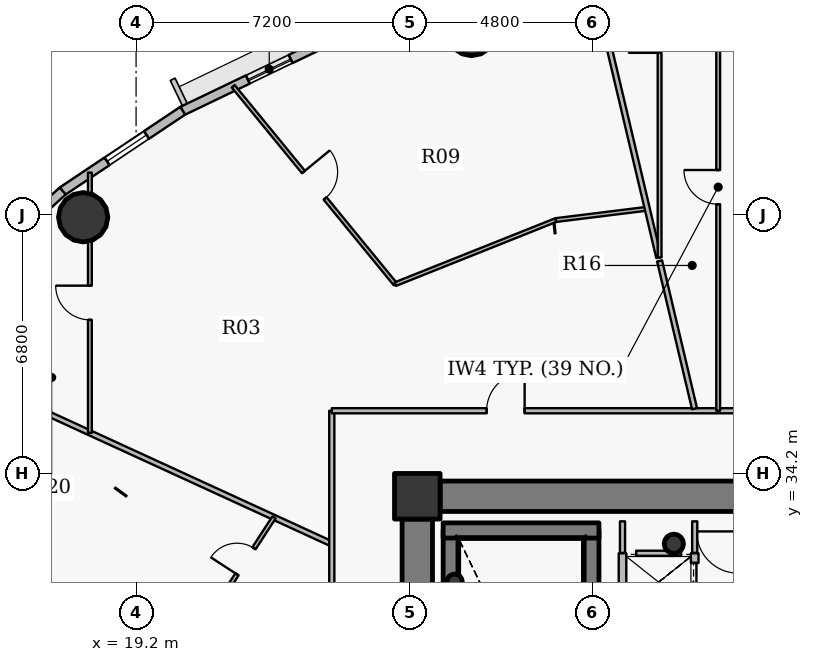
"""IFC4 building model, lengths in metres.
Left out: names, types, materials, properties, quantities, classifications, styles, units other than length and angle.
Written with IfcOpenShell. Run it as: python <this file> out.ifc"""

import sys

from ifc_helpers import new_model, si_unit, direction, frame, frame_2d, origin, origin_2d, place, context, subcontext, project, spatial, rectangle, hollow_circle, extrude, source, transform, mapped, element, fill, save


model = new_model("IFC4")
c1 = context("Model", 3, precision=1e-05, world=origin(), true_north=direction((0.0, 1.0)))
c2 = subcontext(c1, "Body", "Model", "MODEL_VIEW")
j1 = project(units=[si_unit("LENGTHUNIT", "METRE"), si_unit("PLANEANGLEUNIT", "RADIAN")], contexts=[c1])
p1 = place(None, origin())
s1 = spatial("IfcSite", under=j1, at=p1, CompositionType="ELEMENT")
p2 = place(p1, origin())
s2 = spatial("IfcBuilding", under=s1, at=p2, CompositionType="ELEMENT")
p3 = place(p2, frame((0.0, 0.0, 156.15)))
s3 = spatial("IfcBuildingStorey", under=s2, at=p3, CompositionType="ELEMENT", Elevation=156.15)
p4 = place(p3, frame((26.6, 33.6, 0.0), z_axis=(0.0, 0.0, 1.0), x_axis=(1.0, 0.0, 0.0)))
e1 = element("IfcColumn", 1, at=p4, inside=s3, PredefinedType="COLUMN", context=c2, shape_type="SweptSolid", body=[
    extrude(rectangle(XDim=1.2, YDim=1.2, at=origin_2d()), origin(), (0.0, 0.0, 1.0), 3.75),
])
p5 = place(p3, frame((33.35, 32.35, 0.0), z_axis=(0.0, 0.0, 1.0), x_axis=(1.0, 0.0, 0.0)))
e2 = element("IfcColumn", 2, at=p5, inside=s3, PredefinedType="COLUMN", context=c2, shape_type="SweptSolid", body=[
    extrude(hollow_circle(Radius=0.254, WallThickness=0.02, at=origin_2d()), origin(), (0.0, 0.0, 1.0), 3.75),
])
p6 = place(p3, frame((27.48, 24.1, 0.0), z_axis=(0.0, 0.0, 1.0), x_axis=(0.0, 1.0, 0.0)))
e3 = element("IfcWall", 3, at=p6, inside=s3, PredefinedType="SHEAR", context=c2, shape_type="SweptSolid", body=[
    extrude(rectangle(XDim=8.6, YDim=0.4, at=frame_2d((4.3, 0.0))), origin(), (0.0, 0.0, 1.0), 3.75),
])
p7 = place(p3, frame((31.18, 27.8, 0.0), z_axis=(0.0, 0.0, 1.0), x_axis=(0.0, 1.0, 0.0)))
e4 = element("IfcWall", 4, at=p7, inside=s3, PredefinedType="SHEAR", context=c2, shape_type="SweptSolid", body=[
    extrude(rectangle(XDim=4.9, YDim=0.4, at=frame_2d((2.45, 0.0))), origin(), (0.0, 0.0, 1.0), 3.75),
])
p8 = place(p3, frame((27.28, 32.7, 0.0), z_axis=(0.0, 0.0, 1.0), x_axis=(1.0, 0.0, 0.0)))
e5 = element("IfcWall", 5, at=p8, inside=s3, PredefinedType="SHEAR", context=c2, shape_type="SweptSolid", body=[
    extrude(rectangle(XDim=4.1, YDim=0.4, at=frame_2d((2.05, 0.0))), origin(), (0.0, 0.0, 1.0), 3.75),
])
p9 = place(p3, frame((27.58, 31.35, 0.0), z_axis=(0.0, 0.0, 1.0), x_axis=(1.0, 0.0, 0.0)))
e6 = element("IfcColumn", 6, at=p9, inside=s3, PredefinedType="COLUMN", context=c2, shape_type="SweptSolid", body=[
    extrude(hollow_circle(Radius=0.203, WallThickness=0.016, at=origin_2d()), origin(), (0.0, 0.0, 1.0), 3.75),
])
p10 = place(p3, frame((27.2, 33.6, 0.0), z_axis=(0.0, 0.0, 1.0), x_axis=(1.0, 0.0, 0.0)))
e7 = element("IfcWall", 7, at=p10, inside=s3, PredefinedType="SHEAR", context=c2, shape_type="SweptSolid", body=[
    extrude(rectangle(XDim=17.6, YDim=0.8, at=frame_2d((8.8, 0.0))), origin(), (0.0, 0.0, 1.0), 2.95),
])
p11 = place(p10, frame((13.45, 0.0, 0.0)))
e8 = element("IfcOpeningElement", 8, at=p11, cuts=e7, PredefinedType="OPENING", context=c2, shape_type="SweptSolid", body=[
    extrude(rectangle(XDim=1.15, YDim=2.15, at=origin_2d()), frame((0.575, 0.41, 1.075), z_axis=(0.0, -1.0, 0.0), x_axis=(1.0, 0.0, 0.0)), (0.0, 0.0, 1.0), 0.82),
])
p12 = place(p3, frame((26.6, 21.0, 0.0), z_axis=(0.0, 0.0, 1.0), x_axis=(0.0, 1.0, 0.0)))
e9 = element("IfcWall", 9, at=p12, inside=s3, PredefinedType="SHEAR", context=c2, shape_type="SweptSolid", body=[
    extrude(rectangle(XDim=12.0, YDim=0.8, at=frame_2d((6.0, 0.0))), origin(), (0.0, 0.0, 1.0), 2.95),
])
p13 = place(p12, frame((1.061, 0.0, 0.0)))
e10 = element("IfcOpeningElement", 10, at=p13, cuts=e9, PredefinedType="OPENING", context=c2, shape_type="SweptSolid", body=[
    extrude(rectangle(XDim=1.15, YDim=2.15, at=origin_2d()), frame((0.575, 0.41, 1.075), z_axis=(0.0, -1.0, 0.0), x_axis=(1.0, 0.0, 0.0)), (0.0, 0.0, 1.0), 0.82),
])
for number, where, z_axis, x_axis in (
    (11, (28.027, 45.841, 0.0), (0.0, 0.0, 1.0), (1.0, 0.0, 0.0)),
    (12, (17.808, 40.942, 0.0), (0.0, 0.0, 1.0), (1.0, 0.0, 0.0)),
):
    element("IfcColumn", number, at=place(p3, frame(where, z_axis=z_axis, x_axis=x_axis)), inside=s3, PredefinedType="COLUMN", context=c2, shape_type="SweptSolid", body=[
        extrude(hollow_circle(Radius=0.65, WallThickness=0.04, at=origin_2d()), origin(), (0.0, 0.0, 1.0), 3.75),
    ])
p14 = place(p3, frame((20.427, 43.743, 0.0), z_axis=(0.0, 0.0, 1.0), x_axis=(0.901564733809, 0.432644231155, 0.0)))
e13 = element("IfcWall", 13, at=p14, inside=s3, PredefinedType="SOLIDWALL", context=c2, shape_type="SweptSolid", body=[
    extrude(rectangle(XDim=3.93, YDim=0.24, at=frame_2d((1.965, 0.0))), origin(), (0.0, 0.0, 1.0), 3.5),
])
p15 = place(p14, frame((1.9, 0.0, 0.9)))
e14 = element("IfcOpeningElement", 14, at=p15, cuts=e13, PredefinedType="OPENING", context=c2, shape_type="SweptSolid", body=[
    extrude(rectangle(XDim=1.25, YDim=1.65, at=origin_2d()), frame((0.625, 0.13, 0.825), z_axis=(0.0, -1.0, 0.0), x_axis=(1.0, 0.0, 0.0)), (0.0, 0.0, 1.0), 0.26),
])
p16 = place(p3, frame((17.268, 41.631, 0.0), z_axis=(0.0, 0.0, 1.0), x_axis=(0.831228998277, 0.555930168657, 0.0)))
e15 = element("IfcWall", 15, at=p16, inside=s3, PredefinedType="SOLIDWALL", context=c2, shape_type="SweptSolid", body=[
    extrude(rectangle(XDim=3.8, YDim=0.24, at=frame_2d((1.9, 0.0))), origin(), (0.0, 0.0, 1.0), 3.5),
])
p17 = place(p16, frame((1.405, 0.0, 0.9)))
e16 = element("IfcOpeningElement", 16, at=p17, cuts=e15, PredefinedType="OPENING", context=c2, shape_type="SweptSolid", body=[
    extrude(rectangle(XDim=1.25, YDim=1.65, at=origin_2d()), frame((0.625, 0.13, 0.825), z_axis=(0.0, -1.0, 0.0), x_axis=(1.0, 0.0, 0.0)), (0.0, 0.0, 1.0), 0.26),
])
p18 = place(p3, frame((14.572, 39.158, 0.0), z_axis=(0.0, 0.0, 1.0), x_axis=(0.737076565834, 0.675809245349, 0.0)))
e17 = element("IfcWall", 17, at=p18, inside=s3, PredefinedType="SOLIDWALL", context=c2, shape_type="SweptSolid", body=[
    extrude(rectangle(XDim=3.658, YDim=0.24, at=frame_2d((1.829, 0.0))), origin(), (0.0, 0.0, 1.0), 3.5),
])
p19 = place(p3, frame((13.229, 37.45, 0.0), z_axis=(0.0, 0.0, 1.0), x_axis=(0.908867611309, -0.417084721746, 0.0)))
e18 = element("IfcWall", 18, at=p19, inside=s3, PredefinedType="PARTITIONING", context=c2, shape_type="SweptSolid", body=[
    extrude(rectangle(XDim=12.237, YDim=0.135, at=frame_2d((6.118, 0.0))), origin(), (0.0, 0.0, 1.0), 2.935),
])
p20 = place(p3, frame((17.984, 35.267, 0.0), z_axis=(0.0, 0.0, 1.0), x_axis=(0.0, 1.0, 0.0)))
e19 = element("IfcWall", 19, at=p20, inside=s3, PredefinedType="PARTITIONING", context=c2, shape_type="SweptSolid", body=[
    extrude(rectangle(XDim=6.848, YDim=0.1, at=frame_2d((3.424, 0.0))), origin(), (0.0, 0.0, 1.0), 2.935),
])
p21 = place(p20, frame((2.974, 0.0, 0.0)))
e20 = element("IfcOpeningElement", 20, at=p21, cuts=e19, PredefinedType="OPENING", context=c2, shape_type="SweptSolid", body=[
    extrude(rectangle(XDim=0.9, YDim=2.1, at=origin_2d()), frame((0.45, 0.06, 1.05), z_axis=(0.0, -1.0, 0.0), x_axis=(1.0, 0.0, 0.0)), (0.0, 0.0, 1.0), 0.12),
])
p22 = place(p3, frame((21.327, 30.733, 0.0), z_axis=(0.0, 0.0, 1.0), x_axis=(0.545365017792, 0.838198662233, 0.0)))
e21 = element("IfcWall", 21, at=p22, inside=s3, PredefinedType="PARTITIONING", context=c2, shape_type="SweptSolid", body=[
    extrude(rectangle(XDim=2.756, YDim=0.1, at=frame_2d((1.378, 0.0))), origin(), (0.0, 0.0, 1.0), 2.935),
])
p23 = place(p22, frame((0.968, 0.0, 0.0)))
e22 = element("IfcOpeningElement", 22, at=p23, cuts=e21, PredefinedType="OPENING", context=c2, shape_type="SweptSolid", body=[
    extrude(rectangle(XDim=0.82, YDim=2.1, at=origin_2d()), frame((0.41, 0.06, 1.05), z_axis=(0.0, -1.0, 0.0), x_axis=(1.0, 0.0, 0.0)), (0.0, 0.0, 1.0), 0.12),
])
p24 = place(p3, frame((21.756, 44.387, 0.0), z_axis=(0.0, 0.0, 1.0), x_axis=(0.633727642201, -0.773556252325, 0.0)))
e23 = element("IfcWall", 23, at=p24, inside=s3, PredefinedType="PARTITIONING", context=c2, shape_type="SweptSolid", body=[
    extrude(rectangle(XDim=6.729, YDim=0.1, at=frame_2d((3.365, 0.0))), origin(), (0.0, 0.0, 1.0), 2.935),
])
p25 = place(p24, frame((2.915, 0.0, 0.0)))
e24 = element("IfcOpeningElement", 24, at=p25, cuts=e23, PredefinedType="OPENING", context=c2, shape_type="SweptSolid", body=[
    extrude(rectangle(XDim=0.9, YDim=2.1, at=origin_2d()), frame((0.45, 0.06, 1.05), z_axis=(0.0, -1.0, 0.0), x_axis=(1.0, 0.0, 0.0)), (0.0, 0.0, 1.0), 0.12),
])
p26 = place(p3, frame((24.35, 27.95, 0.0), z_axis=(0.0, 0.0, 1.0), x_axis=(0.0, 1.0, 0.0)))
e25 = element("IfcWall", 25, at=p26, inside=s3, PredefinedType="PARTITIONING", context=c2, shape_type="SweptSolid", body=[
    extrude(rectangle(XDim=7.9, YDim=0.135, at=frame_2d((3.95, 0.0))), origin(), (0.0, 0.0, 1.0), 2.935),
])
p27 = place(p3, frame((24.35, 35.85, 0.0), z_axis=(0.0, 0.0, 1.0), x_axis=(1.0, 0.0, 0.0)))
e26 = element("IfcWall", 26, at=p27, inside=s3, PredefinedType="PARTITIONING", context=c2, shape_type="SweptSolid", body=[
    extrude(rectangle(XDim=29.104, YDim=0.135, at=frame_2d((14.552, 0.0))), origin(), (0.0, 0.0, 1.0), 2.935),
])
p28 = place(p27, frame((15.972, 0.0, 0.0)))
e27 = element("IfcOpeningElement", 27, at=p28, cuts=e26, PredefinedType="OPENING", context=c2, shape_type="SweptSolid", body=[
    extrude(rectangle(XDim=1.0, YDim=2.15, at=origin_2d()), frame((0.5, 0.078, 1.075), z_axis=(0.0, -1.0, 0.0), x_axis=(1.0, 0.0, 0.0)), (0.0, 0.0, 1.0), 0.155),
])
p29 = place(p27, frame((4.074, 0.0, 0.0)))
e28 = element("IfcOpeningElement", 28, at=p29, cuts=e26, PredefinedType="OPENING", context=c2, shape_type="SweptSolid", body=[
    extrude(rectangle(XDim=1.0, YDim=2.15, at=origin_2d()), frame((0.5, 0.078, 1.075), z_axis=(0.0, -1.0, 0.0), x_axis=(1.0, 0.0, 0.0)), (0.0, 0.0, 1.0), 0.155),
])
p30 = place(p3, frame((26.021, 39.181, 0.0), z_axis=(0.0, 0.0, 1.0), x_axis=(0.928787254853, 0.37061332305, 0.0)))
e29 = element("IfcWall", 29, at=p30, inside=s3, PredefinedType="PARTITIONING", context=c2, shape_type="SweptSolid", body=[
    extrude(rectangle(XDim=4.549, YDim=0.1, at=frame_2d((2.275, 0.0))), origin(), (0.0, 0.0, 1.0), 2.935),
])
p31 = place(p3, frame((30.246, 40.867, 0.0), z_axis=(0.0, 0.0, 1.0), x_axis=(0.99240598239, 0.123005553192, 0.0)))
e30 = element("IfcWall", 30, at=p31, inside=s3, PredefinedType="PARTITIONING", context=c2, shape_type="SweptSolid", body=[
    extrude(rectangle(XDim=2.423, YDim=0.1, at=frame_2d((1.212, 0.0))), origin(), (0.0, 0.0, 1.0), 2.935),
])
p32 = place(p3, frame((31.194, 47.33, 0.0), z_axis=(0.0, 0.0, 1.0), x_axis=(0.230064999041, -0.973175264902, 0.0)))
e31 = element("IfcWall", 31, at=p32, inside=s3, PredefinedType="PARTITIONING", context=c2, shape_type="SweptSolid", body=[
    extrude(rectangle(XDim=7.654, YDim=0.135, at=frame_2d((3.827, 0.0))), origin(), (0.0, 0.0, 1.0), 2.935),
])
p33 = place(p3, frame((32.0, 24.1, 0.0), z_axis=(0.0, 0.0, 1.0), x_axis=(0.0, 1.0, 0.0)))
e32 = element("IfcWall", 32, at=p33, inside=s3, PredefinedType="PARTITIONING", context=c2, shape_type="SweptSolid", body=[
    extrude(rectangle(XDim=8.0, YDim=0.2, at=frame_2d((4.0, 0.0))), origin(), (0.0, 0.0, 1.0), 3.5),
])
p34 = place(p3, frame((32.976, 39.792, 0.0), z_axis=(0.0, 0.0, 1.0), x_axis=(0.230050705958, -0.973178643769, 0.0)))
e33 = element("IfcWall", 33, at=p34, inside=s3, PredefinedType="PARTITIONING", context=c2, shape_type="SweptSolid", body=[
    extrude(rectangle(XDim=3.996, YDim=0.135, at=frame_2d((1.998, 0.0))), origin(), (0.0, 0.0, 1.0), 3.5),
])
p35 = place(p3, frame((32.976, 39.884, 0.0), z_axis=(0.0, 0.0, 1.0), x_axis=(0.0, 1.0, 0.0)))
e34 = element("IfcWall", 34, at=p35, inside=s3, PredefinedType="PARTITIONING", context=c2, shape_type="SweptSolid", body=[
    extrude(rectangle(XDim=7.64, YDim=0.1, at=frame_2d((3.82, 0.0))), origin(), (0.0, 0.0, 1.0), 2.935),
])
p36 = place(p35, frame((5.384, 0.0, 0.0)))
e35 = element("IfcOpeningElement", 35, at=p36, cuts=e34, PredefinedType="OPENING", context=c2, shape_type="SweptSolid", body=[
    extrude(rectangle(XDim=0.82, YDim=2.1, at=origin_2d()), frame((0.41, 0.06, 1.05), z_axis=(0.0, -1.0, 0.0), x_axis=(1.0, 0.0, 0.0)), (0.0, 0.0, 1.0), 0.12),
])
p37 = place(p3, frame((33.9, 20.8, 0.0), z_axis=(0.0, 0.0, 1.0), x_axis=(0.0, 1.0, 0.0)))
e36 = element("IfcWall", 36, at=p37, inside=s3, PredefinedType="PARTITIONING", context=c2, shape_type="SweptSolid", body=[
    extrude(rectangle(XDim=11.3, YDim=0.2, at=frame_2d((5.65, 0.0))), origin(), (0.0, 0.0, 1.0), 3.085),
])
p38 = place(p37, frame((6.98, 0.0, 0.0)))
e37 = element("IfcOpeningElement", 37, at=p38, cuts=e36, PredefinedType="OPENING", context=c2, shape_type="SweptSolid", body=[
    extrude(rectangle(XDim=1.05, YDim=2.15, at=origin_2d()), frame((0.525, 0.11, 1.075), z_axis=(0.0, -1.0, 0.0), x_axis=(1.0, 0.0, 0.0)), (0.0, 0.0, 1.0), 0.22),
])
p39 = place(p37, frame((8.495, 0.0, 0.0)))
e38 = element("IfcOpeningElement", 38, at=p39, cuts=e36, PredefinedType="OPENING", context=c2, shape_type="SweptSolid", body=[
    extrude(rectangle(XDim=1.05, YDim=2.15, at=origin_2d()), frame((0.525, 0.11, 1.075), z_axis=(0.0, -1.0, 0.0), x_axis=(1.0, 0.0, 0.0)), (0.0, 0.0, 1.0), 0.22),
])
p40 = place(p37, frame((9.995, 0.0, 0.0)))
e39 = element("IfcOpeningElement", 39, at=p40, cuts=e36, PredefinedType="OPENING", context=c2, shape_type="SweptSolid", body=[
    extrude(rectangle(XDim=1.05, YDim=2.15, at=origin_2d()), frame((0.525, 0.11, 1.075), z_axis=(0.0, -1.0, 0.0), x_axis=(1.0, 0.0, 0.0)), (0.0, 0.0, 1.0), 0.22),
])
p41 = place(p3, frame((34.518, 35.85, 0.0), z_axis=(0.0, 0.0, 1.0), x_axis=(0.0, 1.0, 0.0)))
e40 = element("IfcWall", 40, at=p41, inside=s3, PredefinedType="PARTITIONING", context=c2, shape_type="SweptSolid", body=[
    extrude(rectangle(XDim=11.769, YDim=0.1, at=frame_2d((5.884, 0.0))), origin(), (0.0, 0.0, 1.0), 2.935),
])
p42 = place(p41, frame((5.434, 0.0, 0.0)))
e41 = element("IfcOpeningElement", 41, at=p42, cuts=e40, PredefinedType="OPENING", context=c2, shape_type="SweptSolid", body=[
    extrude(rectangle(XDim=0.9, YDim=2.1, at=origin_2d()), frame((0.45, 0.06, 1.05), z_axis=(0.0, -1.0, 0.0), x_axis=(1.0, 0.0, 0.0)), (0.0, 0.0, 1.0), 0.12),
])
p43 = place(p3, frame((32.36, 32.1, 0.0), z_axis=(0.0, 0.0, 1.0), x_axis=(1.0, 0.0, 0.0)))
e42 = element("IfcWall", 42, at=p43, inside=s3, PredefinedType="PARTITIONING", context=c2, shape_type="SweptSolid", body=[
    extrude(rectangle(XDim=1.18, YDim=0.135, at=frame_2d((0.59, 0.0))), origin(), (0.0, 0.0, 1.0), 3.085),
])
p44 = place(p3, frame((32.0, 32.94, 0.0), z_axis=(0.0, 0.0, 1.0), x_axis=(0.0, -1.0, 0.0)))
e43 = element("IfcWall", 43, at=p44, inside=s3, PredefinedType="PARTITIONING", context=c2, shape_type="SweptSolid", body=[
    extrude(rectangle(XDim=0.83, YDim=0.135, at=frame_2d((0.415, 0.0))), origin(), (0.0, 0.0, 1.0), 3.035),
])
p45 = place(p3, frame((33.9, 32.11, 0.0), z_axis=(0.0, 0.0, 1.0), x_axis=(0.0, 1.0, 0.0)))
e44 = element("IfcWall", 44, at=p45, inside=s3, PredefinedType="PARTITIONING", context=c2, shape_type="SweptSolid", body=[
    extrude(rectangle(XDim=0.83, YDim=0.135, at=frame_2d((0.415, 0.0))), origin(), (0.0, 0.0, 1.0), 3.085),
])
p46 = place(p3, frame((27.19, 34.0, 0.0), z_axis=(0.0, 0.0, 1.0), x_axis=(-1.0, 0.0, 0.0)))
e45 = element("IfcWall", 45, at=p46, inside=s3, PredefinedType="PARTITIONING", context=c2, shape_type="SweptSolid", body=[
    extrude(rectangle(XDim=0.99, YDim=0.135, at=frame_2d((0.495, 0.0))), origin(), (0.0, 0.0, 1.0), 2.935),
])
p47 = place(p3, frame((26.2, 33.692, 0.0), z_axis=(0.0, 0.0, 1.0), x_axis=(0.0, -1.0, 0.0)))
e46 = element("IfcWall", 46, at=p47, inside=s3, PredefinedType="PARTITIONING", context=c2, shape_type="SweptSolid", body=[
    extrude(rectangle(XDim=0.682, YDim=0.135, at=frame_2d((0.341, 0.0))), origin(), (0.0, 0.0, 1.0), 3.5),
])
m1 = source(origin(), c2, "Body", "SweptSolid", [
    extrude(rectangle(XDim=1.25, YDim=1.65, at=origin_2d()), frame((0.625, 0.03, 0.825), z_axis=(0.0, -1.0, 0.0), x_axis=(1.0, 0.0, 0.0)), (0.0, 0.0, 1.0), 0.06),
])
p48 = place(p15, origin())
e47 = element("IfcWindow", 47, at=p48, inside=s3, PartitioningType="SINGLE_PANEL", PredefinedType="WINDOW", context=c2, shape_type="MappedRepresentation", body=[
    mapped(m1, transform((0.0, 0.0, 0.0), x_axis=(1.0, 0.0, 0.0), y_axis=(0.0, 1.0, 0.0), z_axis=(0.0, 0.0, 1.0), scale=1.0)),
])
fill(e14, e47)
p49 = place(p17, origin())
e48 = element("IfcWindow", 48, at=p49, inside=s3, PartitioningType="SINGLE_PANEL", PredefinedType="WINDOW", context=c2, shape_type="MappedRepresentation", body=[
    mapped(m1, transform((0.0, 0.0, 0.0), x_axis=(1.0, 0.0, 0.0), y_axis=(0.0, 1.0, 0.0), z_axis=(0.0, 0.0, 1.0), scale=1.0)),
])
fill(e16, e48)
m2 = source(origin(), c2, "Body", "SweptSolid", [
    extrude(rectangle(XDim=1.05, YDim=2.15, at=origin_2d()), frame((0.525, 0.025, 1.075), z_axis=(0.0, -1.0, 0.0), x_axis=(1.0, 0.0, 0.0)), (0.0, 0.0, 1.0), 0.05),
])
p50 = place(p40, origin())
e49 = element("IfcDoor", 49, at=p50, inside=s3, OperationType="DOUBLE_DOOR_SLIDING", PredefinedType="USERDEFINED", context=c2, shape_type="MappedRepresentation", body=[
    mapped(m2, transform((0.0, 0.0, 0.0), x_axis=(1.0, 0.0, 0.0), y_axis=(0.0, 1.0, 0.0), z_axis=(0.0, 0.0, 1.0), scale=1.0)),
])
fill(e39, e49)
m3 = source(origin(), c2, "Body", "SweptSolid", [
    extrude(rectangle(XDim=0.9, YDim=2.1, at=origin_2d()), frame((0.45, 0.025, 1.05), z_axis=(0.0, -1.0, 0.0), x_axis=(1.0, 0.0, 0.0)), (0.0, 0.0, 1.0), 0.05),
])
p51 = place(p42, origin())
e50 = element("IfcDoor", 50, at=p51, inside=s3, OperationType="SINGLE_SWING_RIGHT", PredefinedType="DOOR", context=c2, shape_type="MappedRepresentation", body=[
    mapped(m3, transform((0.0, 0.0, 0.0), x_axis=(1.0, 0.0, 0.0), y_axis=(0.0, 1.0, 0.0), z_axis=(0.0, 0.0, 1.0), scale=1.0)),
])
fill(e41, e50)
m4 = source(origin(), c2, "Body", "SweptSolid", [
    extrude(rectangle(XDim=0.82, YDim=2.1, at=origin_2d()), frame((0.41, 0.025, 1.05), z_axis=(0.0, -1.0, 0.0), x_axis=(1.0, 0.0, 0.0)), (0.0, 0.0, 1.0), 0.05),
])
p52 = place(p36, origin())
e51 = element("IfcDoor", 51, at=p52, inside=s3, OperationType="SINGLE_SWING_LEFT", PredefinedType="DOOR", context=c2, shape_type="MappedRepresentation", body=[
    mapped(m4, transform((0.0, 0.0, 0.0), x_axis=(1.0, 0.0, 0.0), y_axis=(0.0, 1.0, 0.0), z_axis=(0.0, 0.0, 1.0), scale=1.0)),
])
fill(e35, e51)
m5 = source(origin(), c2, "Body", "SweptSolid", [
    extrude(rectangle(XDim=1.0, YDim=2.15, at=origin_2d()), frame((0.5, 0.025, 1.075), z_axis=(0.0, -1.0, 0.0), x_axis=(1.0, 0.0, 0.0)), (0.0, 0.0, 1.0), 0.05),
])
p53 = place(p29, origin())
e52 = element("IfcDoor", 52, at=p53, inside=s3, OperationType="SINGLE_SWING_RIGHT", PredefinedType="DOOR", context=c2, shape_type="MappedRepresentation", body=[
    mapped(m5, transform((0.0, 0.0, 0.0), x_axis=(1.0, 0.0, 0.0), y_axis=(0.0, 1.0, 0.0), z_axis=(0.0, 0.0, 1.0), scale=1.0)),
])
fill(e28, e52)
p54 = place(p25, origin())
e53 = element("IfcDoor", 53, at=p54, inside=s3, OperationType="SINGLE_SWING_LEFT", PredefinedType="DOOR", context=c2, shape_type="MappedRepresentation", body=[
    mapped(m3, transform((0.0, 0.0, 0.0), x_axis=(1.0, 0.0, 0.0), y_axis=(0.0, 1.0, 0.0), z_axis=(0.0, 0.0, 1.0), scale=1.0)),
])
fill(e24, e53)
p55 = place(p21, origin())
e54 = element("IfcDoor", 54, at=p55, inside=s3, OperationType="SINGLE_SWING_RIGHT", PredefinedType="DOOR", context=c2, shape_type="MappedRepresentation", body=[
    mapped(m3, transform((0.0, 0.0, 0.0), x_axis=(1.0, 0.0, 0.0), y_axis=(0.0, 1.0, 0.0), z_axis=(0.0, 0.0, 1.0), scale=1.0)),
])
fill(e20, e54)
p56 = place(p23, origin())
e55 = element("IfcDoor", 55, at=p56, inside=s3, OperationType="SINGLE_SWING_LEFT", PredefinedType="DOOR", context=c2, shape_type="MappedRepresentation", body=[
    mapped(m4, transform((0.0, 0.0, 0.0), x_axis=(1.0, 0.0, 0.0), y_axis=(0.0, 1.0, 0.0), z_axis=(0.0, 0.0, 1.0), scale=1.0)),
])
fill(e22, e55)
save(model, sys.argv[1])
